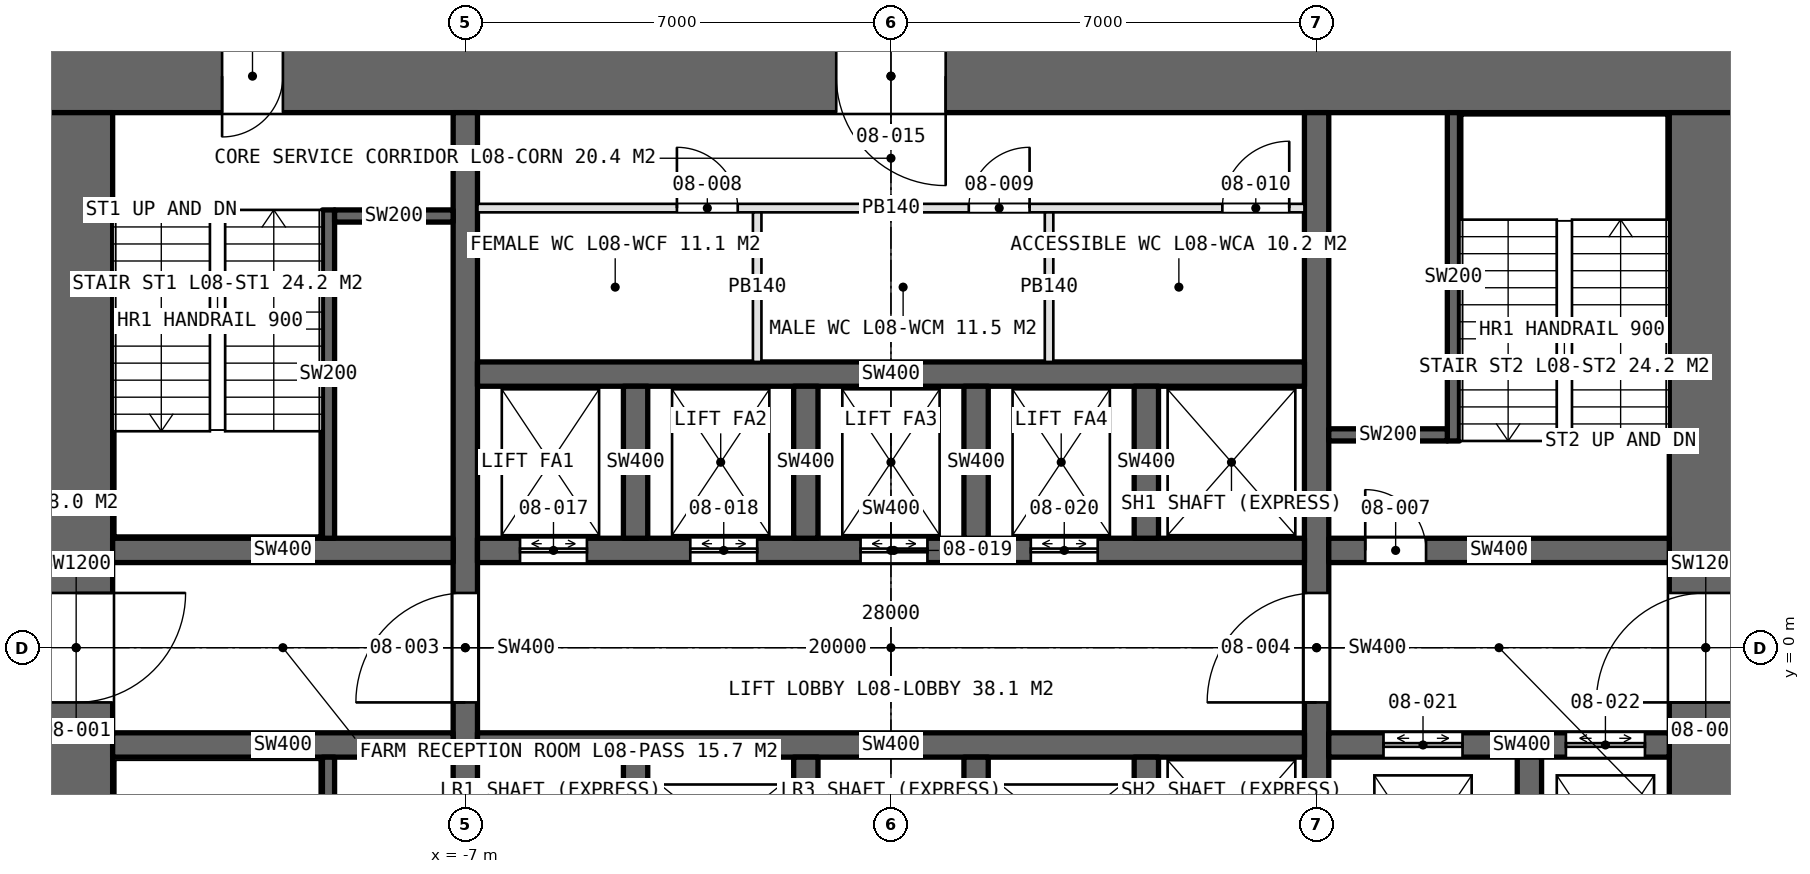
"""IFC4 building model, lengths in metres.
Left out: names, types, materials, properties, quantities, classifications, styles, units other than length and angle.
Written with IfcOpenShell. Run it as: python <this file> out.ifc"""

import sys

from ifc_helpers import new_model, si_unit, direction, frame, frame_2d, origin, place, context, subcontext, project, spatial, rectangle, extrude, element, fill, save


model = new_model("IFC4")
c1 = context("Model", 3, precision=1e-05, world=origin(), true_north=direction((0.0, 1.0)))
c2 = subcontext(c1, "Body", "Model", "MODEL_VIEW")
j1 = project(units=[si_unit("LENGTHUNIT", "METRE"), si_unit("PLANEANGLEUNIT", "RADIAN")], contexts=[c1])
p1 = place(None, origin())
s1 = spatial("IfcSite", under=j1, at=p1, CompositionType="ELEMENT")
p2 = place(p1, origin())
s2 = spatial("IfcBuilding", under=s1, at=p2, CompositionType="ELEMENT")
p3 = place(p2, frame((0.0, 0.0, 40.0)))
s3 = spatial("IfcBuildingStorey", under=s2, at=p3, CompositionType="ELEMENT", Elevation=40.0)
p4 = place(p3, frame((14.0, 9.4, 0.0), z_axis=(0.0, 0.0, 1.0), x_axis=(-1.0, 0.0, 0.0)))
e1 = element("IfcWall", 1, at=p4, inside=s3, PredefinedType="SHEAR", context=c2, shape_type="SweptSolid", body=[
    extrude(rectangle(XDim=28.0, YDim=1.2, at=frame_2d((14.0, 0.0))), origin(), (0.0, 0.0, 1.0), 5.0),
])
p5 = place(p4, frame((24.0, 0.0, 0.0)))
e2 = element("IfcOpeningElement", 2, at=p5, cuts=e1, PredefinedType="OPENING", context=c2, shape_type="SweptSolid", body=[
    extrude(rectangle(XDim=1.0, YDim=2.4, at=frame_2d((0.5, 1.2))), frame((0.0, 0.61, 0.0), z_axis=(0.0, -1.0, 0.0), x_axis=(1.0, 0.0, 0.0)), (0.0, 0.0, 1.0), 1.22),
])
p6 = place(p4, frame((13.1, 0.0, 0.0)))
e3 = element("IfcOpeningElement", 3, at=p6, cuts=e1, PredefinedType="OPENING", context=c2, shape_type="SweptSolid", body=[
    extrude(rectangle(XDim=1.8, YDim=2.4, at=frame_2d((0.9, 1.2))), frame((0.0, 0.61, 0.0), z_axis=(0.0, -1.0, 0.0), x_axis=(1.0, 0.0, 0.0)), (0.0, 0.0, 1.0), 1.22),
])
p7 = place(p3, frame((-13.4, 8.8, 0.0), z_axis=(0.0, 0.0, 1.0), x_axis=(0.0, -1.0, 0.0)))
e4 = element("IfcWall", 4, at=p7, inside=s3, PredefinedType="SHEAR", context=c2, shape_type="SweptSolid", body=[
    extrude(rectangle(XDim=17.6, YDim=1.2, at=frame_2d((8.8, 0.0))), origin(), (0.0, 0.0, 1.0), 5.0),
])
p8 = place(p7, frame((7.9, 0.0, 0.0)))
e5 = element("IfcOpeningElement", 5, at=p8, cuts=e4, PredefinedType="OPENING", context=c2, shape_type="SweptSolid", body=[
    extrude(rectangle(XDim=1.8, YDim=2.4, at=frame_2d((0.9, 1.2))), frame((0.0, 0.61, 0.0), z_axis=(0.0, -1.0, 0.0), x_axis=(1.0, 0.0, 0.0)), (0.0, 0.0, 1.0), 1.22),
])
p9 = place(p7, frame((16.5, 0.0, 0.0)))
e6 = element("IfcOpeningElement", 6, at=p9, cuts=e4, PredefinedType="OPENING", context=c2, shape_type="SweptSolid", body=[
    extrude(rectangle(XDim=1.0, YDim=2.4, at=frame_2d((0.5, 1.2))), frame((0.0, 0.61, 0.0), z_axis=(0.0, -1.0, 0.0), x_axis=(1.0, 0.0, 0.0)), (0.0, 0.0, 1.0), 1.22),
])
p10 = place(p3, frame((13.4, -8.8, 0.0), z_axis=(0.0, 0.0, 1.0), x_axis=(0.0, 1.0, 0.0)))
e7 = element("IfcWall", 7, at=p10, inside=s3, PredefinedType="SHEAR", context=c2, shape_type="SweptSolid", body=[
    extrude(rectangle(XDim=17.6, YDim=1.2, at=frame_2d((8.8, 0.0))), origin(), (0.0, 0.0, 1.0), 5.0),
])
p11 = place(p10, frame((7.9, 0.0, 0.0)))
e8 = element("IfcOpeningElement", 8, at=p11, cuts=e7, PredefinedType="OPENING", context=c2, shape_type="SweptSolid", body=[
    extrude(rectangle(XDim=1.8, YDim=2.4, at=frame_2d((0.9, 1.2))), frame((0.0, 0.61, 0.0), z_axis=(0.0, -1.0, 0.0), x_axis=(1.0, 0.0, 0.0)), (0.0, 0.0, 1.0), 1.22),
])
p12 = place(p3, frame((-7.0, -8.8, 0.0), z_axis=(0.0, 0.0, 1.0), x_axis=(0.0, 1.0, 0.0)))
e9 = element("IfcWall", 9, at=p12, inside=s3, PredefinedType="SHEAR", context=c2, shape_type="SweptSolid", body=[
    extrude(rectangle(XDim=17.6, YDim=0.4, at=frame_2d((8.8, 0.0))), origin(), (0.0, 0.0, 1.0), 5.0),
])
p13 = place(p12, frame((7.9, 0.0, 0.0)))
e10 = element("IfcOpeningElement", 10, at=p13, cuts=e9, PredefinedType="OPENING", context=c2, shape_type="SweptSolid", body=[
    extrude(rectangle(XDim=1.8, YDim=2.4, at=frame_2d((0.9, 1.2))), frame((0.0, 0.21, 0.0), z_axis=(0.0, -1.0, 0.0), x_axis=(1.0, 0.0, 0.0)), (0.0, 0.0, 1.0), 0.42),
])
p14 = place(p3, frame((7.0, -8.8, 0.0), z_axis=(0.0, 0.0, 1.0), x_axis=(0.0, 1.0, 0.0)))
e11 = element("IfcWall", 11, at=p14, inside=s3, PredefinedType="SHEAR", context=c2, shape_type="SweptSolid", body=[
    extrude(rectangle(XDim=17.6, YDim=0.4, at=frame_2d((8.8, 0.0))), origin(), (0.0, 0.0, 1.0), 5.0),
])
p15 = place(p14, frame((7.9, 0.0, 0.0)))
e12 = element("IfcOpeningElement", 12, at=p15, cuts=e11, PredefinedType="OPENING", context=c2, shape_type="SweptSolid", body=[
    extrude(rectangle(XDim=1.8, YDim=2.4, at=frame_2d((0.9, 1.2))), frame((0.0, 0.21, 0.0), z_axis=(0.0, -1.0, 0.0), x_axis=(1.0, 0.0, 0.0)), (0.0, 0.0, 1.0), 0.42),
])
p16 = place(p3, frame((-6.8, 1.6, 0.0), z_axis=(0.0, 0.0, 1.0), x_axis=(1.0, 0.0, 0.0)))
e13 = element("IfcWall", 13, at=p16, inside=s3, PredefinedType="SHEAR", context=c2, shape_type="SweptSolid", body=[
    extrude(rectangle(XDim=13.6, YDim=0.4, at=frame_2d((6.8, 0.0))), origin(), (0.0, 0.0, 1.0), 5.0),
])
p17 = place(p16, frame((0.7, 0.0, 0.0)))
e14 = element("IfcOpeningElement", 14, at=p17, cuts=e13, PredefinedType="OPENING", context=c2, shape_type="SweptSolid", body=[
    extrude(rectangle(XDim=1.1, YDim=2.4, at=frame_2d((0.55, 1.2))), frame((0.0, 0.21, 0.0), z_axis=(0.0, -1.0, 0.0), x_axis=(1.0, 0.0, 0.0)), (0.0, 0.0, 1.0), 0.42),
])
p18 = place(p16, frame((3.5, 0.0, 0.0)))
e15 = element("IfcOpeningElement", 15, at=p18, cuts=e13, PredefinedType="OPENING", context=c2, shape_type="SweptSolid", body=[
    extrude(rectangle(XDim=1.1, YDim=2.4, at=frame_2d((0.55, 1.2))), frame((0.0, 0.21, 0.0), z_axis=(0.0, -1.0, 0.0), x_axis=(1.0, 0.0, 0.0)), (0.0, 0.0, 1.0), 0.42),
])
p19 = place(p16, frame((6.3, 0.0, 0.0)))
e16 = element("IfcOpeningElement", 16, at=p19, cuts=e13, PredefinedType="OPENING", context=c2, shape_type="SweptSolid", body=[
    extrude(rectangle(XDim=1.1, YDim=2.4, at=frame_2d((0.55, 1.2))), frame((0.0, 0.21, 0.0), z_axis=(0.0, -1.0, 0.0), x_axis=(1.0, 0.0, 0.0)), (0.0, 0.0, 1.0), 0.42),
])
p20 = place(p16, frame((9.1, 0.0, 0.0)))
e17 = element("IfcOpeningElement", 17, at=p20, cuts=e13, PredefinedType="OPENING", context=c2, shape_type="SweptSolid", body=[
    extrude(rectangle(XDim=1.1, YDim=2.4, at=frame_2d((0.55, 1.2))), frame((0.0, 0.21, 0.0), z_axis=(0.0, -1.0, 0.0), x_axis=(1.0, 0.0, 0.0)), (0.0, 0.0, 1.0), 0.42),
])
for number, where, z_axis, x_axis in (
    (18, (-6.8, -1.6, 0.0), (0.0, 0.0, 1.0), (1.0, 0.0, 0.0)),
    (19, (-6.8, 4.5, 0.0), (0.0, 0.0, 1.0), (1.0, 0.0, 0.0)),
):
    element("IfcWall", number, at=place(p3, frame(where, z_axis=z_axis, x_axis=x_axis)), inside=s3, PredefinedType="SHEAR", context=c2, shape_type="SweptSolid", body=[
        extrude(rectangle(XDim=13.6, YDim=0.4, at=frame_2d((6.8, 0.0))), origin(), (0.0, 0.0, 1.0), 5.0),
    ])
for number, where, z_axis, x_axis in (
    (20, (-12.8, 1.6, 0.0), (0.0, 0.0, 1.0), (1.0, 0.0, 0.0)),
    (21, (-12.8, -1.6, 0.0), (0.0, 0.0, 1.0), (1.0, 0.0, 0.0)),
):
    element("IfcWall", number, at=place(p3, frame(where, z_axis=z_axis, x_axis=x_axis)), inside=s3, PredefinedType="SHEAR", context=c2, shape_type="SweptSolid", body=[
        extrude(rectangle(XDim=5.6, YDim=0.4, at=frame_2d((2.8, 0.0))), origin(), (0.0, 0.0, 1.0), 5.0),
    ])
p21 = place(p3, frame((7.2, 1.6, 0.0), z_axis=(0.0, 0.0, 1.0), x_axis=(1.0, 0.0, 0.0)))
e22 = element("IfcWall", 22, at=p21, inside=s3, PredefinedType="SHEAR", context=c2, shape_type="SweptSolid", body=[
    extrude(rectangle(XDim=5.6, YDim=0.4, at=frame_2d((2.8, 0.0))), origin(), (0.0, 0.0, 1.0), 5.0),
])
p22 = place(p21, frame((0.6, 0.0, 0.0)))
e23 = element("IfcOpeningElement", 23, at=p22, cuts=e22, PredefinedType="OPENING", context=c2, shape_type="SweptSolid", body=[
    extrude(rectangle(XDim=1.0, YDim=2.4, at=frame_2d((0.5, 1.2))), frame((0.0, 0.21, 0.0), z_axis=(0.0, -1.0, 0.0), x_axis=(1.0, 0.0, 0.0)), (0.0, 0.0, 1.0), 0.42),
])
p23 = place(p3, frame((7.2, -1.6, 0.0), z_axis=(0.0, 0.0, 1.0), x_axis=(1.0, 0.0, 0.0)))
e24 = element("IfcWall", 24, at=p23, inside=s3, PredefinedType="SHEAR", context=c2, shape_type="SweptSolid", body=[
    extrude(rectangle(XDim=5.6, YDim=0.4, at=frame_2d((2.8, 0.0))), origin(), (0.0, 0.0, 1.0), 5.0),
])
p24 = place(p23, frame((0.9, 0.0, 0.0)))
e25 = element("IfcOpeningElement", 25, at=p24, cuts=e24, PredefinedType="OPENING", context=c2, shape_type="SweptSolid", body=[
    extrude(rectangle(XDim=1.3, YDim=2.4, at=frame_2d((0.65, 1.2))), frame((0.0, 0.21, 0.0), z_axis=(0.0, -1.0, 0.0), x_axis=(1.0, 0.0, 0.0)), (0.0, 0.0, 1.0), 0.42),
])
p25 = place(p23, frame((3.9, 0.0, 0.0)))
e26 = element("IfcOpeningElement", 26, at=p25, cuts=e24, PredefinedType="OPENING", context=c2, shape_type="SweptSolid", body=[
    extrude(rectangle(XDim=1.3, YDim=2.4, at=frame_2d((0.65, 1.2))), frame((0.0, 0.21, 0.0), z_axis=(0.0, -1.0, 0.0), x_axis=(1.0, 0.0, 0.0)), (0.0, 0.0, 1.0), 0.42),
])
p26 = place(p3, frame((10.5, -4.8, 0.0), z_axis=(0.0, 0.0, 1.0), x_axis=(0.0, 1.0, 0.0)))
e27 = element("IfcWall", 27, at=p26, inside=s3, PredefinedType="SHEAR", context=c2, shape_type="SweptSolid", body=[
    extrude(rectangle(XDim=3.0, YDim=0.4, at=frame_2d((1.5, 0.0))), origin(), (0.0, 0.0, 1.0), 5.0),
])
for number, where, z_axis, x_axis in (
    (28, (-4.2, 1.8, 0.0), (0.0, 0.0, 1.0), (0.0, 1.0, 0.0)),
    (29, (-4.2, -4.3, 0.0), (0.0, 0.0, 1.0), (0.0, 1.0, 0.0)),
    (30, (-1.4, 1.8, 0.0), (0.0, 0.0, 1.0), (0.0, 1.0, 0.0)),
    (31, (-1.4, -4.3, 0.0), (0.0, 0.0, 1.0), (0.0, 1.0, 0.0)),
    (32, (1.4, 1.8, 0.0), (0.0, 0.0, 1.0), (0.0, 1.0, 0.0)),
    (33, (1.4, -4.3, 0.0), (0.0, 0.0, 1.0), (0.0, 1.0, 0.0)),
    (34, (4.2, 1.8, 0.0), (0.0, 0.0, 1.0), (0.0, 1.0, 0.0)),
    (35, (4.2, -4.3, 0.0), (0.0, 0.0, 1.0), (0.0, 1.0, 0.0)),
):
    element("IfcWall", number, at=place(p3, frame(where, z_axis=z_axis, x_axis=x_axis)), inside=s3, PredefinedType="SHEAR", context=c2, shape_type="SweptSolid", body=[
        extrude(rectangle(XDim=2.5, YDim=0.4, at=frame_2d((1.25, 0.0))), origin(), (0.0, 0.0, 1.0), 5.0),
    ])
p27 = place(p3, frame((-6.8, 7.23, 0.0), z_axis=(0.0, 0.0, 1.0), x_axis=(1.0, 0.0, 0.0)))
e36 = element("IfcWall", 36, at=p27, inside=s3, PredefinedType="PARTITIONING", context=c2, shape_type="SweptSolid", body=[
    extrude(rectangle(XDim=13.6, YDim=0.14, at=frame_2d((6.8, 0.0))), origin(), (0.0, 0.0, 1.0), 4.75),
])
p28 = place(p27, frame((3.28, 0.0, 0.0)))
e37 = element("IfcOpeningElement", 37, at=p28, cuts=e36, PredefinedType="OPENING", context=c2, shape_type="SweptSolid", body=[
    extrude(rectangle(XDim=1.0, YDim=2.4, at=frame_2d((0.5, 1.2))), frame((0.0, 0.08, 0.0), z_axis=(0.0, -1.0, 0.0), x_axis=(1.0, 0.0, 0.0)), (0.0, 0.0, 1.0), 0.16),
])
p29 = place(p27, frame((8.08, 0.0, 0.0)))
e38 = element("IfcOpeningElement", 38, at=p29, cuts=e36, PredefinedType="OPENING", context=c2, shape_type="SweptSolid", body=[
    extrude(rectangle(XDim=1.0, YDim=2.4, at=frame_2d((0.5, 1.2))), frame((0.0, 0.08, 0.0), z_axis=(0.0, -1.0, 0.0), x_axis=(1.0, 0.0, 0.0)), (0.0, 0.0, 1.0), 0.16),
])
p30 = place(p27, frame((12.25, 0.0, 0.0)))
e39 = element("IfcOpeningElement", 39, at=p30, cuts=e36, PredefinedType="OPENING", context=c2, shape_type="SweptSolid", body=[
    extrude(rectangle(XDim=1.1, YDim=2.4, at=frame_2d((0.55, 1.2))), frame((0.0, 0.08, 0.0), z_axis=(0.0, -1.0, 0.0), x_axis=(1.0, 0.0, 0.0)), (0.0, 0.0, 1.0), 0.16),
])
for number, where, z_axis, x_axis in (
    (40, (-2.2, 4.7, 0.0), (0.0, 0.0, 1.0), (0.0, 1.0, 0.0)),
    (41, (2.6, 4.7, 0.0), (0.0, 0.0, 1.0), (0.0, 1.0, 0.0)),
):
    element("IfcWall", number, at=place(p3, frame(where, z_axis=z_axis, x_axis=x_axis)), inside=s3, PredefinedType="PARTITIONING", context=c2, shape_type="SweptSolid", body=[
        extrude(rectangle(XDim=2.46, YDim=0.14, at=frame_2d((1.23, 0.0))), origin(), (0.0, 0.0, 1.0), 4.75),
    ])
p31 = place(p3, frame((-9.25, 7.2, 0.0), z_axis=(0.0, 0.0, 1.0), x_axis=(0.0, -1.0, 0.0)))
e42 = element("IfcWall", 42, at=p31, inside=s3, PredefinedType="SOLIDWALL", context=c2, shape_type="SweptSolid", body=[
    extrude(rectangle(XDim=5.4, YDim=0.2, at=frame_2d((2.7, 0.0))), origin(), (0.0, 0.0, 1.0), 5.0),
])
p32 = place(p3, frame((-9.15, 7.1, 0.0), z_axis=(0.0, 0.0, 1.0), x_axis=(1.0, 0.0, 0.0)))
e43 = element("IfcWall", 43, at=p32, inside=s3, PredefinedType="SOLIDWALL", context=c2, shape_type="SweptSolid", body=[
    extrude(rectangle(XDim=1.95, YDim=0.2, at=frame_2d((0.975, 0.0))), origin(), (0.0, 0.0, 1.0), 5.0),
])
p33 = place(p3, frame((-9.25, -7.2, 0.0), z_axis=(0.0, 0.0, 1.0), x_axis=(0.0, 1.0, 0.0)))
e44 = element("IfcWall", 44, at=p33, inside=s3, PredefinedType="SOLIDWALL", context=c2, shape_type="SweptSolid", body=[
    extrude(rectangle(XDim=5.4, YDim=0.2, at=frame_2d((2.7, 0.0))), origin(), (0.0, 0.0, 1.0), 5.0),
])
p34 = place(p3, frame((9.25, 3.4, 0.0), z_axis=(0.0, 0.0, 1.0), x_axis=(0.0, 1.0, 0.0)))
e45 = element("IfcWall", 45, at=p34, inside=s3, PredefinedType="SOLIDWALL", context=c2, shape_type="SweptSolid", body=[
    extrude(rectangle(XDim=5.4, YDim=0.2, at=frame_2d((2.7, 0.0))), origin(), (0.0, 0.0, 1.0), 5.0),
])
p35 = place(p3, frame((9.15, 3.5, 0.0), z_axis=(0.0, 0.0, 1.0), x_axis=(-1.0, 0.0, 0.0)))
e46 = element("IfcWall", 46, at=p35, inside=s3, PredefinedType="SOLIDWALL", context=c2, shape_type="SweptSolid", body=[
    extrude(rectangle(XDim=1.95, YDim=0.2, at=frame_2d((0.975, 0.0))), origin(), (0.0, 0.0, 1.0), 5.0),
])
p36 = place(p8, origin())
e47 = element("IfcDoor", 47, at=p36, inside=s3, OperationType="DOUBLE_DOOR_SINGLE_SWING", PredefinedType="DOOR", context=c2, shape_type="SweptSolid", body=[
    extrude(rectangle(XDim=1.8, YDim=2.4, at=frame_2d((0.9, 1.2))), frame((0.0, 0.025, 0.0), z_axis=(0.0, -1.0, 0.0), x_axis=(1.0, 0.0, 0.0)), (0.0, 0.0, 1.0), 0.05),
])
fill(e5, e47)
p37 = place(p11, origin())
e48 = element("IfcDoor", 48, at=p37, inside=s3, OperationType="DOUBLE_DOOR_SINGLE_SWING", PredefinedType="DOOR", context=c2, shape_type="SweptSolid", body=[
    extrude(rectangle(XDim=1.8, YDim=2.4, at=frame_2d((0.9, 1.2))), frame((0.0, 0.025, 0.0), z_axis=(0.0, -1.0, 0.0), x_axis=(1.0, 0.0, 0.0)), (0.0, 0.0, 1.0), 0.05),
])
fill(e8, e48)
p38 = place(p13, origin())
e49 = element("IfcDoor", 49, at=p38, inside=s3, OperationType="DOUBLE_DOOR_SINGLE_SWING", PredefinedType="DOOR", context=c2, shape_type="SweptSolid", body=[
    extrude(rectangle(XDim=1.8, YDim=2.4, at=frame_2d((0.9, 1.2))), frame((0.0, 0.025, 0.0), z_axis=(0.0, -1.0, 0.0), x_axis=(1.0, 0.0, 0.0)), (0.0, 0.0, 1.0), 0.05),
])
fill(e10, e49)
p39 = place(p15, origin())
e50 = element("IfcDoor", 50, at=p39, inside=s3, OperationType="DOUBLE_DOOR_SINGLE_SWING", PredefinedType="DOOR", context=c2, shape_type="SweptSolid", body=[
    extrude(rectangle(XDim=1.8, YDim=2.4, at=frame_2d((0.9, 1.2))), frame((0.0, 0.025, 0.0), z_axis=(0.0, -1.0, 0.0), x_axis=(1.0, 0.0, 0.0)), (0.0, 0.0, 1.0), 0.05),
])
fill(e12, e50)
p40 = place(p5, origin())
e51 = element("IfcDoor", 51, at=p40, inside=s3, OperationType="SINGLE_SWING_RIGHT", PredefinedType="DOOR", context=c2, shape_type="SweptSolid", body=[
    extrude(rectangle(XDim=1.0, YDim=2.4, at=frame_2d((0.5, 1.2))), frame((0.0, 0.025, 0.0), z_axis=(0.0, -1.0, 0.0), x_axis=(1.0, 0.0, 0.0)), (0.0, 0.0, 1.0), 0.05),
])
fill(e2, e51)
p41 = place(p22, origin())
e52 = element("IfcDoor", 52, at=p41, inside=s3, OperationType="SINGLE_SWING_LEFT", PredefinedType="DOOR", context=c2, shape_type="SweptSolid", body=[
    extrude(rectangle(XDim=1.0, YDim=2.4, at=frame_2d((0.5, 1.2))), frame((0.0, 0.025, 0.0), z_axis=(0.0, -1.0, 0.0), x_axis=(1.0, 0.0, 0.0)), (0.0, 0.0, 1.0), 0.05),
])
fill(e23, e52)
p42 = place(p28, origin())
e53 = element("IfcDoor", 53, at=p42, inside=s3, OperationType="SINGLE_SWING_LEFT", PredefinedType="DOOR", context=c2, shape_type="SweptSolid", body=[
    extrude(rectangle(XDim=1.0, YDim=2.4, at=frame_2d((0.5, 1.2))), frame((0.0, 0.025, 0.0), z_axis=(0.0, -1.0, 0.0), x_axis=(1.0, 0.0, 0.0)), (0.0, 0.0, 1.0), 0.05),
])
fill(e37, e53)
p43 = place(p29, origin())
e54 = element("IfcDoor", 54, at=p43, inside=s3, OperationType="SINGLE_SWING_RIGHT", PredefinedType="DOOR", context=c2, shape_type="SweptSolid", body=[
    extrude(rectangle(XDim=1.0, YDim=2.4, at=frame_2d((0.5, 1.2))), frame((0.0, 0.025, 0.0), z_axis=(0.0, -1.0, 0.0), x_axis=(1.0, 0.0, 0.0)), (0.0, 0.0, 1.0), 0.05),
])
fill(e38, e54)
p44 = place(p30, origin())
e55 = element("IfcDoor", 55, at=p44, inside=s3, OperationType="SINGLE_SWING_RIGHT", PredefinedType="DOOR", context=c2, shape_type="SweptSolid", body=[
    extrude(rectangle(XDim=1.1, YDim=2.4, at=frame_2d((0.55, 1.2))), frame((0.0, 0.025, 0.0), z_axis=(0.0, -1.0, 0.0), x_axis=(1.0, 0.0, 0.0)), (0.0, 0.0, 1.0), 0.05),
])
fill(e39, e55)
p45 = place(p6, origin())
e56 = element("IfcDoor", 56, at=p45, inside=s3, OperationType="DOUBLE_DOOR_SINGLE_SWING", PredefinedType="DOOR", context=c2, shape_type="SweptSolid", body=[
    extrude(rectangle(XDim=1.8, YDim=2.4, at=frame_2d((0.9, 1.2))), frame((0.0, 0.025, 0.0), z_axis=(0.0, -1.0, 0.0), x_axis=(1.0, 0.0, 0.0)), (0.0, 0.0, 1.0), 0.05),
])
fill(e3, e56)
p46 = place(p17, origin())
e57 = element("IfcDoor", 57, at=p46, inside=s3, OperationType="DOUBLE_DOOR_SLIDING", PredefinedType="DOOR", context=c2, shape_type="SweptSolid", body=[
    extrude(rectangle(XDim=1.1, YDim=2.4, at=frame_2d((0.55, 1.2))), frame((0.0, 0.025, 0.0), z_axis=(0.0, -1.0, 0.0), x_axis=(1.0, 0.0, 0.0)), (0.0, 0.0, 1.0), 0.05),
])
fill(e14, e57)
p47 = place(p18, origin())
e58 = element("IfcDoor", 58, at=p47, inside=s3, OperationType="DOUBLE_DOOR_SLIDING", PredefinedType="DOOR", context=c2, shape_type="SweptSolid", body=[
    extrude(rectangle(XDim=1.1, YDim=2.4, at=frame_2d((0.55, 1.2))), frame((0.0, 0.025, 0.0), z_axis=(0.0, -1.0, 0.0), x_axis=(1.0, 0.0, 0.0)), (0.0, 0.0, 1.0), 0.05),
])
fill(e15, e58)
p48 = place(p19, origin())
e59 = element("IfcDoor", 59, at=p48, inside=s3, OperationType="DOUBLE_DOOR_SLIDING", PredefinedType="DOOR", context=c2, shape_type="SweptSolid", body=[
    extrude(rectangle(XDim=1.1, YDim=2.4, at=frame_2d((0.55, 1.2))), frame((0.0, 0.025, 0.0), z_axis=(0.0, -1.0, 0.0), x_axis=(1.0, 0.0, 0.0)), (0.0, 0.0, 1.0), 0.05),
])
fill(e16, e59)
p49 = place(p20, origin())
e60 = element("IfcDoor", 60, at=p49, inside=s3, OperationType="DOUBLE_DOOR_SLIDING", PredefinedType="DOOR", context=c2, shape_type="SweptSolid", body=[
    extrude(rectangle(XDim=1.1, YDim=2.4, at=frame_2d((0.55, 1.2))), frame((0.0, 0.025, 0.0), z_axis=(0.0, -1.0, 0.0), x_axis=(1.0, 0.0, 0.0)), (0.0, 0.0, 1.0), 0.05),
])
fill(e17, e60)
p50 = place(p24, origin())
e61 = element("IfcDoor", 61, at=p50, inside=s3, OperationType="DOUBLE_DOOR_SLIDING", PredefinedType="DOOR", context=c2, shape_type="SweptSolid", body=[
    extrude(rectangle(XDim=1.3, YDim=2.4, at=frame_2d((0.65, 1.2))), frame((0.0, 0.025, 0.0), z_axis=(0.0, -1.0, 0.0), x_axis=(1.0, 0.0, 0.0)), (0.0, 0.0, 1.0), 0.05),
])
fill(e25, e61)
p51 = place(p25, origin())
e62 = element("IfcDoor", 62, at=p51, inside=s3, OperationType="DOUBLE_DOOR_SLIDING", PredefinedType="DOOR", context=c2, shape_type="SweptSolid", body=[
    extrude(rectangle(XDim=1.3, YDim=2.4, at=frame_2d((0.65, 1.2))), frame((0.0, 0.025, 0.0), z_axis=(0.0, -1.0, 0.0), x_axis=(1.0, 0.0, 0.0)), (0.0, 0.0, 1.0), 0.05),
])
fill(e26, e62)
save(model, sys.argv[1])
